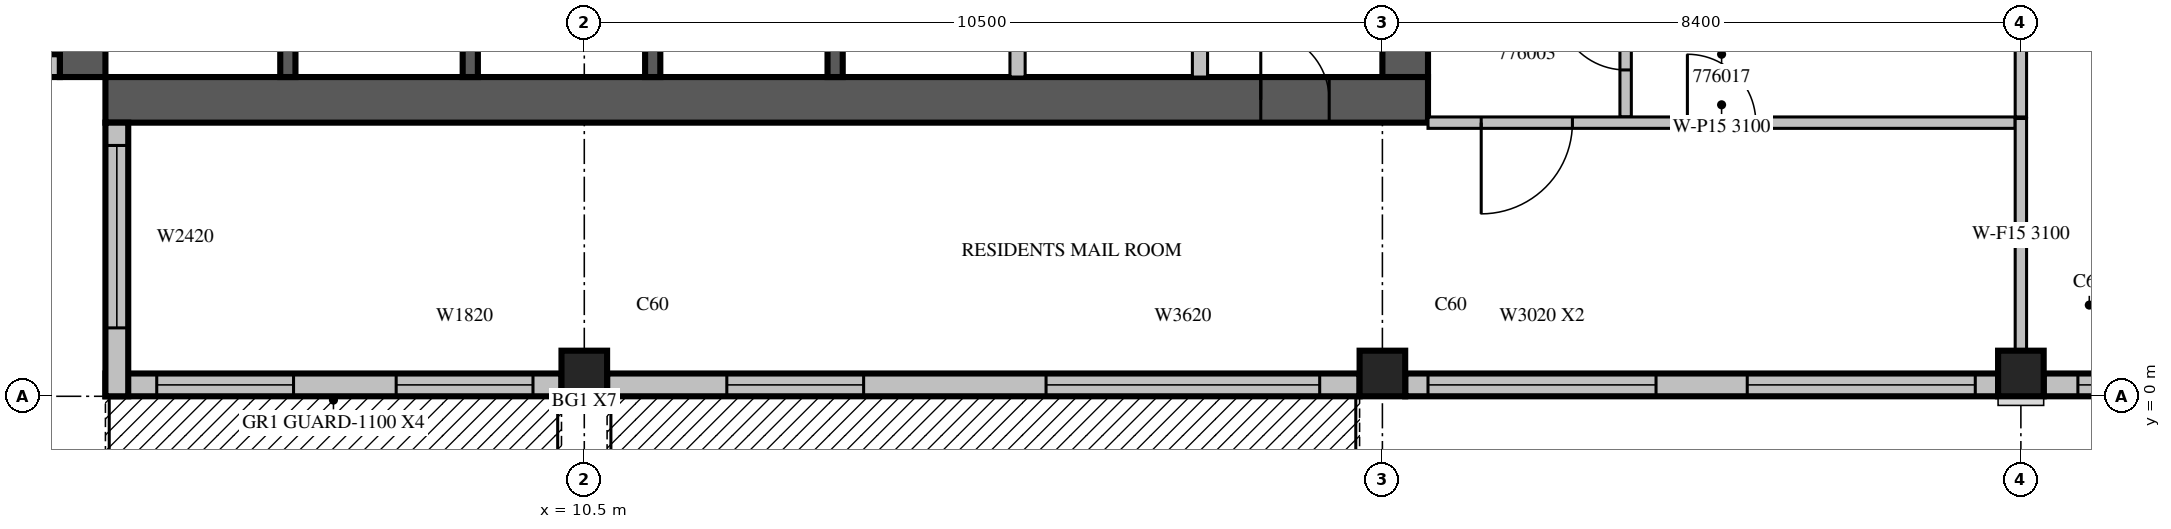
"""IFC4 building model, lengths in metres.
Left out: names, types, materials, properties, quantities, classifications, styles, units other than length and angle.
Written with IfcOpenShell. Run it as: python <this file> out.ifc"""

import sys

from ifc_helpers import new_model, si_unit, direction, frame, frame_2d, origin, origin_2d, place, context, subcontext, project, spatial, rectangle, extrude, source, transform, mapped, element, fill, save


model = new_model("IFC4")
c1 = context("Model", 3, precision=1e-05, world=origin(), true_north=direction((0.0, 1.0)))
c2 = subcontext(c1, "Body", "Model", "MODEL_VIEW")
j1 = project(units=[si_unit("LENGTHUNIT", "METRE"), si_unit("PLANEANGLEUNIT", "RADIAN")], contexts=[c1])
p1 = place(None, origin())
s1 = spatial("IfcSite", under=j1, at=p1, CompositionType="ELEMENT")
p2 = place(p1, origin())
s2 = spatial("IfcBuilding", under=s1, at=p2, CompositionType="ELEMENT")
p3 = place(p2, frame((0.0, 0.0, 326.5)))
s3 = spatial("IfcBuildingStorey", under=s2, at=p3, CompositionType="ELEMENT", Elevation=326.5)
p4 = place(p3, frame((10.5, 0.3, 0.0), z_axis=(0.0, 0.0, 1.0), x_axis=(1.0, 0.0, 0.0)))
e1 = element("IfcColumn", 1, at=p4, inside=s3, PredefinedType="COLUMN", context=c2, shape_type="SweptSolid", body=[
    extrude(rectangle(XDim=0.6, YDim=0.6, at=origin_2d()), origin(), (0.0, 0.0, 1.0), 3.5),
])
m1 = source(origin(), c2, "Body", "SweptSolid", [
    extrude(rectangle(XDim=0.6, YDim=0.6, at=origin_2d()), origin(), (0.0, 0.0, 1.0), 3.5),
])
for number, where, z_axis, x_axis in (
    (2, (21.0, 0.3, 0.0), (0.0, 0.0, 1.0), (1.0, 0.0, 0.0)),
    (3, (29.4, 0.3, 0.0), (0.0, 0.0, 1.0), (1.0, 0.0, 0.0)),
):
    element("IfcColumn", number, at=place(p3, frame(where, z_axis=z_axis, x_axis=x_axis)), inside=s3, PredefinedType="COLUMN", context=c2, shape_type="MappedRepresentation", body=[
        mapped(m1, transform((0.0, 0.0, 0.0), scale=1.0)),
    ])
m2 = source(origin(), c2, "Body", "SweptSolid", [
    extrude(rectangle(XDim=17.4, YDim=0.6, at=frame_2d((8.7, 0.0))), origin(), (0.0, 0.0, 1.0), 3.5),
])
p5 = place(p3, frame((3.9, 4.2, 0.0), z_axis=(0.0, 0.0, 1.0), x_axis=(0.0, 1.0, 0.0)))
e4 = element("IfcWall", 4, at=p5, inside=s3, PredefinedType="SHEAR", context=c2, shape_type="MappedRepresentation", body=[
    mapped(m2, transform((0.0, 0.0, 0.0), scale=1.0)),
])
m3 = source(origin(), c2, "Body", "SweptSolid", [
    extrude(rectangle(XDim=2.2, YDim=2.1, at=frame_2d((1.1, 1.05))), frame((0.0, 0.31, 0.0), z_axis=(0.0, -1.0, 0.0), x_axis=(1.0, 0.0, 0.0)), (0.0, 0.0, 1.0), 0.62),
])
p6 = place(p5, frame((4.2, 0.0, 0.0)))
e5 = element("IfcOpeningElement", 5, at=p6, cuts=e4, PredefinedType="OPENING", context=c2, shape_type="MappedRepresentation", body=[
    mapped(m3, transform((0.0, 0.0, 0.0), scale=1.0)),
])
m4 = source(origin(), c2, "Body", "SweptSolid", [
    extrude(rectangle(XDim=6.3, YDim=0.6, at=frame_2d((3.15, 0.0))), origin(), (0.0, 0.0, 1.0), 3.5),
])
p7 = place(p3, frame((21.3, 4.2, 0.0), z_axis=(0.0, 0.0, 1.0), x_axis=(0.0, 1.0, 0.0)))
e6 = element("IfcWall", 6, at=p7, inside=s3, PredefinedType="SHEAR", context=c2, shape_type="MappedRepresentation", body=[
    mapped(m4, transform((0.0, 0.0, 0.0), scale=1.0)),
])
p8 = place(p7, frame((4.0, 0.0, 0.0)))
e7 = element("IfcOpeningElement", 7, at=p8, cuts=e6, PredefinedType="OPENING", context=c2, shape_type="MappedRepresentation", body=[
    mapped(m3, transform((0.0, 0.0, 0.0), scale=1.0)),
])
p9 = place(p3, frame((4.2, 3.9, 0.0), z_axis=(0.0, 0.0, 1.0), x_axis=(1.0, 0.0, 0.0)))
e8 = element("IfcWall", 8, at=p9, inside=s3, PredefinedType="SHEAR", context=c2, shape_type="MappedRepresentation", body=[
    mapped(m2, transform((0.0, 0.0, 0.0), scale=1.0)),
])
m5 = source(origin(), c2, "Body", "SweptSolid", [
    extrude(rectangle(XDim=0.9, YDim=2.1, at=frame_2d((0.45, 1.05))), frame((0.0, 0.31, 0.0), z_axis=(0.0, -1.0, 0.0), x_axis=(1.0, 0.0, 0.0)), (0.0, 0.0, 1.0), 0.62),
])
p10 = place(p9, frame((15.2, 0.0, 0.0)))
e9 = element("IfcOpeningElement", 9, at=p10, cuts=e8, PredefinedType="OPENING", context=c2, shape_type="MappedRepresentation", body=[
    mapped(m5, transform((0.0, 0.0, 0.0), scale=1.0)),
])
p11 = place(p3, frame((4.2, 0.15, 0.0), z_axis=(0.0, 0.0, 1.0), x_axis=(1.0, 0.0, 0.0)))
e10 = element("IfcWall", 10, at=p11, inside=s3, PredefinedType="STANDARD", context=c2, shape_type="SweptSolid", body=[
    extrude(rectangle(XDim=6.0, YDim=0.3, at=frame_2d((3.0, 0.0))), origin(), (0.0, 0.0, 1.0), 3.1),
])
m6 = source(origin(), c2, "Body", "SweptSolid", [
    extrude(rectangle(XDim=1.8, YDim=2.4, at=frame_2d((0.9, 1.2))), frame((0.0, 0.16, 0.0), z_axis=(0.0, -1.0, 0.0), x_axis=(1.0, 0.0, 0.0)), (0.0, 0.0, 1.0), 0.32),
])
p12 = place(p11, frame((0.675, 0.0, 0.0)))
e11 = element("IfcOpeningElement", 11, at=p12, cuts=e10, PredefinedType="OPENING", context=c2, shape_type="MappedRepresentation", body=[
    mapped(m6, transform((0.0, 0.0, 0.0), scale=1.0)),
])
m7 = source(origin(), c2, "Body", "SweptSolid", [
    extrude(rectangle(XDim=1.8, YDim=2.0, at=frame_2d((0.9, 1.0))), frame((0.0, 0.16, 0.0), z_axis=(0.0, -1.0, 0.0), x_axis=(1.0, 0.0, 0.0)), (0.0, 0.0, 1.0), 0.32),
])
p13 = place(p11, frame((3.825, 0.0, 0.6)))
e12 = element("IfcOpeningElement", 12, at=p13, cuts=e10, PredefinedType="OPENING", context=c2, shape_type="MappedRepresentation", body=[
    mapped(m7, transform((0.0, 0.0, 0.0), scale=1.0)),
])
p14 = place(p3, frame((10.8, 0.15, 0.0), z_axis=(0.0, 0.0, 1.0), x_axis=(1.0, 0.0, 0.0)))
e13 = element("IfcWall", 13, at=p14, inside=s3, PredefinedType="STANDARD", context=c2, shape_type="SweptSolid", body=[
    extrude(rectangle(XDim=9.9, YDim=0.3, at=frame_2d((4.95, 0.0))), origin(), (0.0, 0.0, 1.0), 3.1),
])
p15 = place(p14, frame((1.575, 0.0, 0.0)))
e14 = element("IfcOpeningElement", 14, at=p15, cuts=e13, PredefinedType="OPENING", context=c2, shape_type="MappedRepresentation", body=[
    mapped(m6, transform((0.0, 0.0, 0.0), scale=1.0)),
])
m8 = source(origin(), c2, "Body", "SweptSolid", [
    extrude(rectangle(XDim=3.6, YDim=2.0, at=frame_2d((1.8, 1.0))), frame((0.0, 0.16, 0.0), z_axis=(0.0, -1.0, 0.0), x_axis=(1.0, 0.0, 0.0)), (0.0, 0.0, 1.0), 0.32),
])
p16 = place(p14, frame((5.775, 0.0, 0.6)))
e15 = element("IfcOpeningElement", 15, at=p16, cuts=e13, PredefinedType="OPENING", context=c2, shape_type="MappedRepresentation", body=[
    mapped(m8, transform((0.0, 0.0, 0.0), scale=1.0)),
])
p17 = place(p3, frame((21.3, 0.15, 0.0), z_axis=(0.0, 0.0, 1.0), x_axis=(1.0, 0.0, 0.0)))
e16 = element("IfcWall", 16, at=p17, inside=s3, PredefinedType="STANDARD", context=c2, shape_type="SweptSolid", body=[
    extrude(rectangle(XDim=7.8, YDim=0.3, at=frame_2d((3.9, 0.0))), origin(), (0.0, 0.0, 1.0), 3.1),
])
m9 = source(origin(), c2, "Body", "SweptSolid", [
    extrude(rectangle(XDim=3.0, YDim=2.0, at=frame_2d((1.5, 1.0))), frame((0.0, 0.16, 0.0), z_axis=(0.0, -1.0, 0.0), x_axis=(1.0, 0.0, 0.0)), (0.0, 0.0, 1.0), 0.32),
])
p18 = place(p17, frame((0.3, 0.0, 0.6)))
e17 = element("IfcOpeningElement", 17, at=p18, cuts=e16, PredefinedType="OPENING", context=c2, shape_type="MappedRepresentation", body=[
    mapped(m9, transform((0.0, 0.0, 0.0), scale=1.0)),
])
p19 = place(p17, frame((4.5, 0.0, 0.6)))
e18 = element("IfcOpeningElement", 18, at=p19, cuts=e16, PredefinedType="OPENING", context=c2, shape_type="MappedRepresentation", body=[
    mapped(m9, transform((0.0, 0.0, 0.0), scale=1.0)),
])
p20 = place(p3, frame((29.7, 0.15, 0.0), z_axis=(0.0, 0.0, 1.0), x_axis=(1.0, 0.0, 0.0)))
e19 = element("IfcWall", 19, at=p20, inside=s3, PredefinedType="STANDARD", context=c2, shape_type="SweptSolid", body=[
    extrude(rectangle(XDim=2.1, YDim=0.3, at=frame_2d((1.05, 0.0))), origin(), (0.0, 0.0, 1.0), 3.1),
])
m10 = source(origin(), c2, "Body", "SweptSolid", [
    extrude(rectangle(XDim=1.2, YDim=2.0, at=frame_2d((0.6, 1.0))), frame((0.0, 0.16, 0.0), z_axis=(0.0, -1.0, 0.0), x_axis=(1.0, 0.0, 0.0)), (0.0, 0.0, 1.0), 0.32),
])
p21 = place(p20, frame((0.45, 0.0, 0.6)))
e20 = element("IfcOpeningElement", 20, at=p21, cuts=e19, PredefinedType="OPENING", context=c2, shape_type="MappedRepresentation", body=[
    mapped(m10, transform((0.0, 0.0, 0.0), scale=1.0)),
])
m11 = source(origin(), c2, "Body", "SweptSolid", [
    extrude(rectangle(XDim=3.6, YDim=0.3, at=frame_2d((1.8, 0.0))), origin(), (0.0, 0.0, 1.0), 3.1),
])
p22 = place(p3, frame((0.0, 4.35, 0.0), z_axis=(0.0, 0.0, 1.0), x_axis=(1.0, 0.0, 0.0)))
e21 = element("IfcWall", 21, at=p22, inside=s3, PredefinedType="STANDARD", context=c2, shape_type="MappedRepresentation", body=[
    mapped(m11, transform((0.0, 0.0, 0.0), scale=1.0)),
])
m12 = source(origin(), c2, "Body", "SweptSolid", [
    extrude(rectangle(XDim=2.4, YDim=2.0, at=frame_2d((1.2, 1.0))), frame((0.0, 0.16, 0.0), z_axis=(0.0, -1.0, 0.0), x_axis=(1.0, 0.0, 0.0)), (0.0, 0.0, 1.0), 0.32),
])
p23 = place(p22, frame((0.9, 0.0, 0.6)))
e22 = element("IfcOpeningElement", 22, at=p23, cuts=e21, PredefinedType="OPENING", context=c2, shape_type="MappedRepresentation", body=[
    mapped(m12, transform((0.0, 0.0, 0.0), scale=1.0)),
])
p24 = place(p3, frame((4.35, 3.6, 0.0), z_axis=(0.0, 0.0, 1.0), x_axis=(0.0, -1.0, 0.0)))
e23 = element("IfcWall", 23, at=p24, inside=s3, PredefinedType="STANDARD", context=c2, shape_type="MappedRepresentation", body=[
    mapped(m11, transform((0.0, 0.0, 0.0), scale=1.0)),
])
p25 = place(p24, frame((0.3, 0.0, 0.6)))
e24 = element("IfcOpeningElement", 24, at=p25, cuts=e23, PredefinedType="OPENING", context=c2, shape_type="MappedRepresentation", body=[
    mapped(m12, transform((0.0, 0.0, 0.0), scale=1.0)),
])
m13 = source(origin(), c2, "Body", "SweptSolid", [
    extrude(rectangle(XDim=3.1, YDim=0.2, at=frame_2d((1.55, 0.0))), origin(), (0.0, 0.0, 1.0), 3.5),
])
for number, where, z_axis, x_axis in (
    (25, (6.6, 4.2, 0.0), (0.0, 0.0, 1.0), (0.0, 1.0, 0.0)),
    (26, (9.0, 4.2, 0.0), (0.0, 0.0, 1.0), (0.0, 1.0, 0.0)),
    (27, (11.4, 4.2, 0.0), (0.0, 0.0, 1.0), (0.0, 1.0, 0.0)),
):
    element("IfcWall", number, at=place(p3, frame(where, z_axis=z_axis, x_axis=x_axis)), inside=s3, PredefinedType="SOLIDWALL", context=c2, shape_type="MappedRepresentation", body=[
        mapped(m13, transform((0.0, 0.0, 0.0), scale=1.0)),
    ])
m14 = source(origin(), c2, "Body", "SweptSolid", [
    extrude(rectangle(XDim=3.1, YDim=0.2, at=frame_2d((1.55, 0.0))), origin(), (0.0, 0.0, 1.0), 3.1),
])
p26 = place(p3, frame((13.8, 4.2, 0.0), z_axis=(0.0, 0.0, 1.0), x_axis=(0.0, 1.0, 0.0)))
e28 = element("IfcWall", 28, at=p26, inside=s3, PredefinedType="SOLIDWALL", context=c2, shape_type="MappedRepresentation", body=[
    mapped(m14, transform((0.0, 0.0, 0.0), scale=1.0)),
])
m15 = source(origin(), c2, "Body", "SweptSolid", [
    extrude(rectangle(XDim=3.1, YDim=0.2, at=frame_2d((1.55, 0.0))), origin(), (0.0, 0.0, 1.0), 3.1),
])
for number, where, z_axis, x_axis in (
    (29, (16.2, 4.2, 0.0), (0.0, 0.0, 1.0), (0.0, 1.0, 0.0)),
    (30, (18.6, 4.2, 0.0), (0.0, 0.0, 1.0), (0.0, 1.0, 0.0)),
):
    element("IfcWall", number, at=place(p3, frame(where, z_axis=z_axis, x_axis=x_axis)), inside=s3, PredefinedType="PARTITIONING", context=c2, shape_type="MappedRepresentation", body=[
        mapped(m15, transform((0.0, 0.0, 0.0), scale=1.0)),
    ])
m16 = source(origin(), c2, "Body", "SweptSolid", [
    extrude(rectangle(XDim=4.275, YDim=0.15, at=frame_2d((2.138, 0.0))), origin(), (0.0, 0.0, 1.0), 3.1),
])
p27 = place(p3, frame((24.2, 7.95, 0.0), z_axis=(0.0, 0.0, 1.0), x_axis=(0.0, -1.0, 0.0)))
e31 = element("IfcWall", 31, at=p27, inside=s3, PredefinedType="PARTITIONING", context=c2, shape_type="MappedRepresentation", body=[
    mapped(m16, transform((0.0, 0.0, 0.0), scale=1.0)),
])
m17 = source(origin(), c2, "Body", "SweptSolid", [
    extrude(rectangle(XDim=0.9, YDim=2.1, at=frame_2d((0.45, 1.05))), frame((0.0, 0.085, 0.0), z_axis=(0.0, -1.0, 0.0), x_axis=(1.0, 0.0, 0.0)), (0.0, 0.0, 1.0), 0.17),
])
p28 = place(p27, frame((2.756, 0.0, 0.0)))
e32 = element("IfcOpeningElement", 32, at=p28, cuts=e31, PredefinedType="OPENING", context=c2, shape_type="MappedRepresentation", body=[
    mapped(m17, transform((0.0, 0.0, 0.0), scale=1.0)),
])
p29 = place(p3, frame((29.4, 3.675, 0.0), z_axis=(0.0, 0.0, 1.0), x_axis=(0.0, 1.0, 0.0)))
e33 = element("IfcWall", 33, at=p29, inside=s3, PredefinedType="PARTITIONING", context=c2, shape_type="MappedRepresentation", body=[
    mapped(m16, transform((0.0, 0.0, 0.0), scale=1.0)),
])
m18 = source(origin(), c2, "Body", "SweptSolid", [
    extrude(rectangle(XDim=7.725, YDim=0.15, at=frame_2d((3.862, 0.0))), origin(), (0.0, 0.0, 1.0), 3.1),
])
p30 = place(p3, frame((21.6, 3.6, 0.0), z_axis=(0.0, 0.0, 1.0), x_axis=(1.0, 0.0, 0.0)))
e34 = element("IfcWall", 34, at=p30, inside=s3, PredefinedType="PARTITIONING", context=c2, shape_type="MappedRepresentation", body=[
    mapped(m18, transform((0.0, 0.0, 0.0), scale=1.0)),
])
m19 = source(origin(), c2, "Body", "SweptSolid", [
    extrude(rectangle(XDim=1.2, YDim=2.1, at=frame_2d((0.6, 1.05))), frame((0.0, 0.085, 0.0), z_axis=(0.0, -1.0, 0.0), x_axis=(1.0, 0.0, 0.0)), (0.0, 0.0, 1.0), 0.17),
])
p31 = place(p30, frame((0.7, 0.0, 0.0)))
e35 = element("IfcOpeningElement", 35, at=p31, cuts=e34, PredefinedType="OPENING", context=c2, shape_type="MappedRepresentation", body=[
    mapped(m19, transform((0.0, 0.0, 0.0), scale=1.0)),
])
p32 = place(p30, frame((3.413, 0.0, 0.0)))
e36 = element("IfcOpeningElement", 36, at=p32, cuts=e34, PredefinedType="OPENING", context=c2, shape_type="MappedRepresentation", body=[
    mapped(m17, transform((0.0, 0.0, 0.0), scale=1.0)),
])
p33 = place(p3, frame((29.4, 0.599, 0.0), z_axis=(0.0, 0.0, 1.0), x_axis=(0.0, 1.0, 0.0)))
e37 = element("IfcWall", 37, at=p33, inside=s3, PredefinedType="PARTITIONING", context=c2, shape_type="SweptSolid", body=[
    extrude(rectangle(XDim=3.056, YDim=0.15, at=frame_2d((1.528, 0.0))), origin(), (0.0, 0.0, 1.0), 3.1),
])
m20 = source(origin(), c2, "Body", "SweptSolid", [
    extrude(rectangle(XDim=1.8, YDim=2.4, at=frame_2d((0.9, 1.2))), frame((0.0, 0.025, 0.0), z_axis=(0.0, -1.0, 0.0), x_axis=(1.0, 0.0, 0.0)), (0.0, 0.0, 1.0), 0.05),
])
p34 = place(p12, origin())
e38 = element("IfcDoor", 38, at=p34, inside=s3, OperationType="SLIDING_TO_LEFT", PredefinedType="DOOR", context=c2, shape_type="MappedRepresentation", body=[
    mapped(m20, transform((0.0, 0.0, 0.0), scale=1.0)),
])
fill(e11, e38)
m21 = source(origin(), c2, "Body", "SweptSolid", [
    extrude(rectangle(XDim=1.8, YDim=2.0, at=frame_2d((0.9, 1.0))), frame((0.0, 0.03, 0.0), z_axis=(0.0, -1.0, 0.0), x_axis=(1.0, 0.0, 0.0)), (0.0, 0.0, 1.0), 0.06),
])
p35 = place(p13, origin())
e39 = element("IfcWindow", 39, at=p35, inside=s3, PartitioningType="SINGLE_PANEL", PredefinedType="WINDOW", context=c2, shape_type="MappedRepresentation", body=[
    mapped(m21, transform((0.0, 0.0, 0.0), scale=1.0)),
])
fill(e12, e39)
p36 = place(p15, origin())
e40 = element("IfcDoor", 40, at=p36, inside=s3, OperationType="SLIDING_TO_LEFT", PredefinedType="DOOR", context=c2, shape_type="MappedRepresentation", body=[
    mapped(m20, transform((0.0, 0.0, 0.0), scale=1.0)),
])
fill(e14, e40)
m22 = source(origin(), c2, "Body", "SweptSolid", [
    extrude(rectangle(XDim=3.6, YDim=2.0, at=frame_2d((1.8, 1.0))), frame((0.0, 0.03, 0.0), z_axis=(0.0, -1.0, 0.0), x_axis=(1.0, 0.0, 0.0)), (0.0, 0.0, 1.0), 0.06),
])
p37 = place(p16, origin())
e41 = element("IfcWindow", 41, at=p37, inside=s3, PartitioningType="SINGLE_PANEL", PredefinedType="WINDOW", context=c2, shape_type="MappedRepresentation", body=[
    mapped(m22, transform((0.0, 0.0, 0.0), scale=1.0)),
])
fill(e15, e41)
m23 = source(origin(), c2, "Body", "SweptSolid", [
    extrude(rectangle(XDim=3.0, YDim=2.0, at=frame_2d((1.5, 1.0))), frame((0.0, 0.03, 0.0), z_axis=(0.0, -1.0, 0.0), x_axis=(1.0, 0.0, 0.0)), (0.0, 0.0, 1.0), 0.06),
])
p38 = place(p18, origin())
e42 = element("IfcWindow", 42, at=p38, inside=s3, PartitioningType="SINGLE_PANEL", PredefinedType="WINDOW", context=c2, shape_type="MappedRepresentation", body=[
    mapped(m23, transform((0.0, 0.0, 0.0), scale=1.0)),
])
fill(e17, e42)
p39 = place(p19, origin())
e43 = element("IfcWindow", 43, at=p39, inside=s3, PartitioningType="SINGLE_PANEL", PredefinedType="WINDOW", context=c2, shape_type="MappedRepresentation", body=[
    mapped(m23, transform((0.0, 0.0, 0.0), scale=1.0)),
])
fill(e18, e43)
m24 = source(origin(), c2, "Body", "SweptSolid", [
    extrude(rectangle(XDim=1.2, YDim=2.0, at=frame_2d((0.6, 1.0))), frame((0.0, 0.03, 0.0), z_axis=(0.0, -1.0, 0.0), x_axis=(1.0, 0.0, 0.0)), (0.0, 0.0, 1.0), 0.06),
])
p40 = place(p21, origin())
e44 = element("IfcWindow", 44, at=p40, inside=s3, PartitioningType="SINGLE_PANEL", PredefinedType="WINDOW", context=c2, shape_type="MappedRepresentation", body=[
    mapped(m24, transform((0.0, 0.0, 0.0), scale=1.0)),
])
fill(e20, e44)
m25 = source(origin(), c2, "Body", "SweptSolid", [
    extrude(rectangle(XDim=2.4, YDim=2.0, at=frame_2d((1.2, 1.0))), frame((0.0, 0.03, 0.0), z_axis=(0.0, -1.0, 0.0), x_axis=(1.0, 0.0, 0.0)), (0.0, 0.0, 1.0), 0.06),
])
p41 = place(p25, origin())
e45 = element("IfcWindow", 45, at=p41, inside=s3, PartitioningType="SINGLE_PANEL", PredefinedType="WINDOW", context=c2, shape_type="MappedRepresentation", body=[
    mapped(m25, transform((0.0, 0.0, 0.0), scale=1.0)),
])
fill(e24, e45)
m26 = source(origin(), c2, "Body", "SweptSolid", [
    extrude(rectangle(XDim=0.9, YDim=2.1, at=frame_2d((0.45, 1.05))), frame((0.0, 0.025, 0.0), z_axis=(0.0, -1.0, 0.0), x_axis=(1.0, 0.0, 0.0)), (0.0, 0.0, 1.0), 0.05),
])
p42 = place(p10, origin())
e46 = element("IfcDoor", 46, at=p42, inside=s3, OperationType="SINGLE_SWING_LEFT", PredefinedType="DOOR", context=c2, shape_type="MappedRepresentation", body=[
    mapped(m26, transform((0.0, 0.0, 0.0), scale=1.0)),
])
fill(e9, e46)
p43 = place(p28, origin())
e47 = element("IfcDoor", 47, at=p43, inside=s3, OperationType="SINGLE_SWING_RIGHT", PredefinedType="DOOR", context=c2, shape_type="MappedRepresentation", body=[
    mapped(m26, transform((0.0, 0.0, 0.0), scale=1.0)),
])
fill(e32, e47)
m27 = source(origin(), c2, "Body", "SweptSolid", [
    extrude(rectangle(XDim=1.2, YDim=2.1, at=frame_2d((0.6, 1.05))), frame((0.0, 0.025, 0.0), z_axis=(0.0, -1.0, 0.0), x_axis=(1.0, 0.0, 0.0)), (0.0, 0.0, 1.0), 0.05),
])
p44 = place(p31, origin())
e48 = element("IfcDoor", 48, at=p44, inside=s3, OperationType="SINGLE_SWING_RIGHT", PredefinedType="DOOR", context=c2, shape_type="MappedRepresentation", body=[
    mapped(m27, transform((0.0, 0.0, 0.0), scale=1.0)),
])
fill(e35, e48)
p45 = place(p32, origin())
e49 = element("IfcDoor", 49, at=p45, inside=s3, OperationType="SINGLE_SWING_LEFT", PredefinedType="DOOR", context=c2, shape_type="MappedRepresentation", body=[
    mapped(m26, transform((0.0, 0.0, 0.0), scale=1.0)),
])
fill(e36, e49)
save(model, sys.argv[1])
